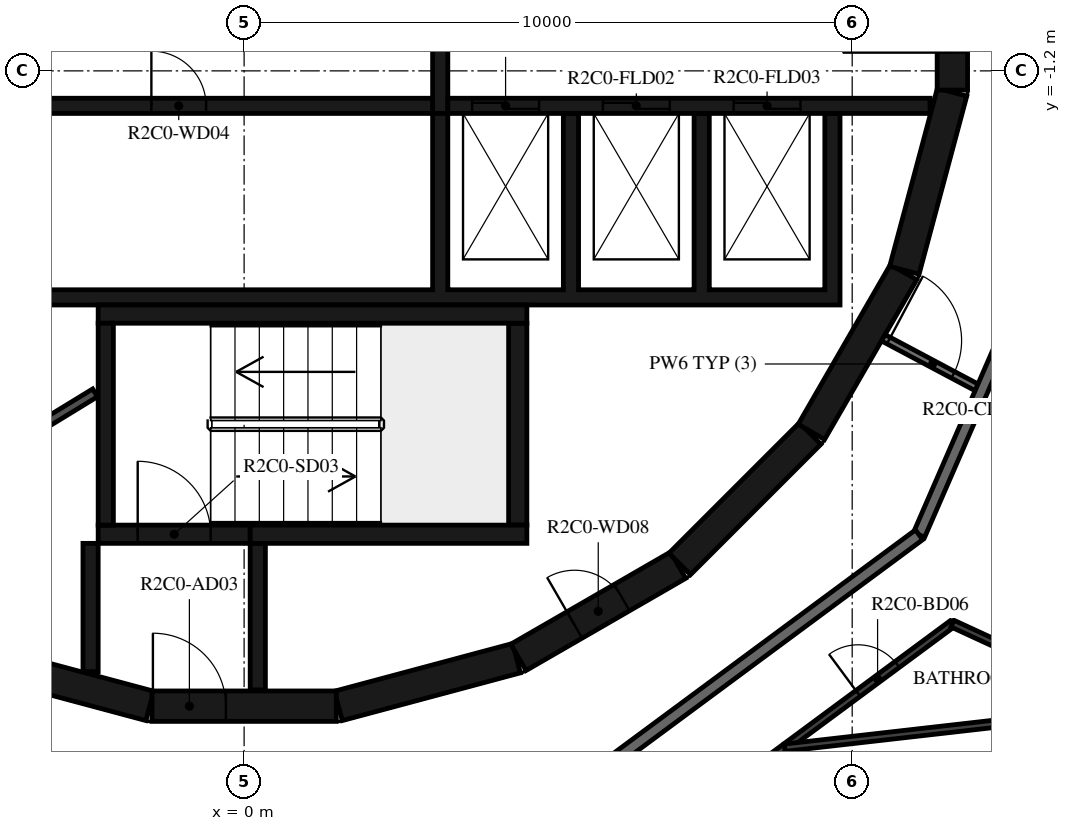
"""IFC4 building model, lengths in metres.
Left out: names, types, materials, properties, quantities, classifications, styles, units other than length and angle.
Written with IfcOpenShell. Run it as: python <this file> out.ifc"""

import sys

from ifc_helpers import new_model, si_unit, direction, frame, frame_2d, origin, place, context, subcontext, project, spatial, polyline, rectangle, outline, extrude, element, fill, save


model = new_model("IFC4")
c1 = context("Model", 3, precision=1e-05, world=origin(), true_north=direction((0.0, 1.0)))
c2 = subcontext(c1, "Body", "Model", "MODEL_VIEW")
j1 = project(units=[si_unit("LENGTHUNIT", "METRE"), si_unit("PLANEANGLEUNIT", "RADIAN")], contexts=[c1])
p1 = place(None, origin())
s1 = spatial("IfcSite", under=j1, at=p1, CompositionType="ELEMENT")
p2 = place(p1, origin())
s2 = spatial("IfcBuilding", under=s1, at=p2, CompositionType="ELEMENT")
p3 = place(p2, frame((0.0, 0.0, 97.7)))
s3 = spatial("IfcBuildingStorey", under=s2, at=p3, CompositionType="ELEMENT", Elevation=97.7)
p4 = place(p3, frame((1.55, -11.643, 0.0), z_axis=(0.0, 0.0, 1.0), x_axis=(0.965948410781, 0.258734743916, 0.0)))
e1 = element("IfcWall", 1, at=p4, inside=s3, PredefinedType="SHEAR", context=c2, shape_type="SweptSolid", body=[
    extrude(rectangle(XDim=3.033, YDim=0.5, at=frame_2d((1.516, 0.0))), origin(), (0.0, 0.0, 1.0), 3.12),
])
p5 = place(p3, frame((4.51, -10.845, 0.0), z_axis=(0.0, 0.0, 1.0), x_axis=(0.865975092491, 0.500087131594, 0.0)))
e2 = element("IfcWall", 2, at=p5, inside=s3, PredefinedType="SHEAR", context=c2, shape_type="SweptSolid", body=[
    extrude(rectangle(XDim=3.033, YDim=0.5, at=frame_2d((1.516, 0.0))), origin(), (0.0, 0.0, 1.0), 3.12),
])
p6 = place(p5, frame((1.066, 0.0, 0.0)))
e3 = element("IfcOpeningElement", 3, at=p6, cuts=e2, PredefinedType="OPENING", context=c2, shape_type="SweptSolid", body=[
    extrude(rectangle(XDim=0.9, YDim=2.1, at=frame_2d((0.45, 1.05))), frame((0.0, 0.26, 0.0), z_axis=(0.0, -1.0, 0.0), x_axis=(1.0, 0.0, 0.0)), (0.0, 0.0, 1.0), 0.52),
])
p7 = place(p3, frame((7.164, -9.308, 0.0), z_axis=(0.0, 0.0, 1.0), x_axis=(0.707106781187, 0.707106781187, 0.0)))
e4 = element("IfcWall", 4, at=p7, inside=s3, PredefinedType="SHEAR", context=c2, shape_type="SweptSolid", body=[
    extrude(rectangle(XDim=3.032, YDim=0.5, at=frame_2d((1.516, 0.0))), origin(), (0.0, 0.0, 1.0), 3.12),
])
for number, where, z_axis, x_axis in (
    (5, (9.329, -7.137, 0.0), (0.0, 0.0, 1.0), (0.5, 0.866, 0.0)),
    (6, (10.858, -4.479, 0.0), (0.0, 0.0, 1.0), (0.259, 0.966, 0.0)),
):
    element("IfcWall", number, at=place(p3, frame(where, z_axis=z_axis, x_axis=x_axis)), inside=s3, PredefinedType="SHEAR", context=c2, shape_type="SweptSolid", body=[
        extrude(rectangle(XDim=3.033, YDim=0.5, at=frame_2d((1.516, 0.0))), origin(), (0.0, 0.0, 1.0), 3.12),
    ])
p8 = place(p3, frame((11.647, -1.516, 0.0), z_axis=(0.0, 0.0, 1.0), x_axis=(0.0, 1.0, 0.0)))
e7 = element("IfcWall", 7, at=p8, inside=s3, PredefinedType="SHEAR", context=c2, shape_type="SweptSolid", body=[
    extrude(rectangle(XDim=3.033, YDim=0.5, at=frame_2d((1.516, 0.0))), origin(), (0.0, 0.0, 1.0), 3.12),
])
p9 = place(p8, frame((0.616, 0.0, 0.0)))
e8 = element("IfcOpeningElement", 8, at=p9, cuts=e7, PredefinedType="OPENING", context=c2, shape_type="SweptSolid", body=[
    extrude(rectangle(XDim=1.8, YDim=2.1, at=frame_2d((0.9, 1.05))), frame((0.0, 0.26, 0.0), z_axis=(0.0, -1.0, 0.0), x_axis=(1.0, 0.0, 0.0)), (0.0, 0.0, 1.0), 0.52),
])
p10 = place(p3, frame((-4.479, -10.858, 0.0), z_axis=(0.0, 0.0, 1.0), x_axis=(0.965948410781, -0.258734743916, 0.0)))
e9 = element("IfcWall", 9, at=p10, inside=s3, PredefinedType="SHEAR", context=c2, shape_type="SweptSolid", body=[
    extrude(rectangle(XDim=3.033, YDim=0.5, at=frame_2d((1.516, 0.0))), origin(), (0.0, 0.0, 1.0), 3.12),
])
p11 = place(p3, frame((-1.516, -11.647, 0.0), z_axis=(0.0, 0.0, 1.0), x_axis=(1.0, 0.0, 0.0)))
e10 = element("IfcWall", 10, at=p11, inside=s3, PredefinedType="SHEAR", context=c2, shape_type="SweptSolid", body=[
    extrude(rectangle(XDim=3.033, YDim=0.5, at=frame_2d((1.516, 0.0))), origin(), (0.0, 0.0, 1.0), 3.12),
])
p12 = place(p11, frame((0.016, 0.0, 0.0)))
e11 = element("IfcOpeningElement", 11, at=p12, cuts=e10, PredefinedType="OPENING", context=c2, shape_type="SweptSolid", body=[
    extrude(rectangle(XDim=1.2, YDim=2.1, at=frame_2d((0.6, 1.05))), frame((0.0, 0.26, 0.0), z_axis=(0.0, -1.0, 0.0), x_axis=(1.0, 0.0, 0.0)), (0.0, 0.0, 1.0), 0.52),
])
p13 = place(p3, frame((-2.275, -8.67, 0.0), z_axis=(0.0, 0.0, 1.0), x_axis=(0.0, 1.0, 0.0)))
e12 = element("IfcWall", 12, at=p13, inside=s3, PredefinedType="SHEAR", context=c2, shape_type="SweptSolid", body=[
    extrude(rectangle(XDim=3.32, YDim=0.25, at=frame_2d((1.66, 0.0))), origin(), (0.0, 0.0, 1.0), 3.12),
])
p14 = place(p3, frame((-2.4, -5.2, 0.0), z_axis=(0.0, 0.0, 1.0), x_axis=(1.0, 0.0, 0.0)))
e13 = element("IfcWall", 13, at=p14, inside=s3, PredefinedType="SHEAR", context=c2, shape_type="SweptSolid", body=[
    extrude(rectangle(XDim=7.05, YDim=0.3, at=frame_2d((3.525, 0.0))), origin(), (0.0, 0.0, 1.0), 3.12),
])
p15 = place(p3, frame((4.5, -8.67, 0.0), z_axis=(0.0, 0.0, 1.0), x_axis=(0.0, 1.0, 0.0)))
e14 = element("IfcWall", 14, at=p15, inside=s3, PredefinedType="SHEAR", context=c2, shape_type="SweptSolid", body=[
    extrude(rectangle(XDim=3.32, YDim=0.3, at=frame_2d((1.66, 0.0))), origin(), (0.0, 0.0, 1.0), 3.12),
])
p16 = place(p3, frame((0.1, -8.82, 0.0), z_axis=(0.0, 0.0, 1.0), x_axis=(1.0, 0.0, 0.0)))
e15 = element("IfcWall", 15, at=p16, inside=s3, PredefinedType="SHEAR", context=c2, shape_type="SweptSolid", body=[
    extrude(rectangle(XDim=4.55, YDim=0.3, at=frame_2d((2.275, 0.0))), origin(), (0.0, 0.0, 1.0), 3.12),
])
p17 = place(p3, frame((-2.4, -8.82, 0.0), z_axis=(0.0, 0.0, 1.0), x_axis=(1.0, 0.0, 0.0)))
e16 = element("IfcWall", 16, at=p17, inside=s3, PredefinedType="SHEAR", context=c2, shape_type="SweptSolid", body=[
    extrude(rectangle(XDim=2.5, YDim=0.3, at=frame_2d((1.25, 0.0))), origin(), (0.0, 0.0, 1.0), 3.12),
])
p18 = place(p17, frame((0.65, 0.0, 0.0)))
e17 = element("IfcOpeningElement", 17, at=p18, cuts=e16, PredefinedType="OPENING", context=c2, shape_type="SweptSolid", body=[
    extrude(rectangle(XDim=1.2, YDim=2.1, at=frame_2d((0.6, 1.05))), frame((0.0, 0.16, 0.0), z_axis=(0.0, -1.0, 0.0), x_axis=(1.0, 0.0, 0.0)), (0.0, 0.0, 1.0), 0.32),
])
p19 = place(p3, frame((-2.525, -8.97, 0.0), z_axis=(0.0, 0.0, 1.0), x_axis=(0.0, -1.0, 0.0)))
e18 = element("IfcWall", 18, at=p19, inside=s3, PredefinedType="SHEAR", context=c2, shape_type="SweptSolid", body=[
    extrude(rectangle(XDim=2.11, YDim=0.25, at=frame_2d((1.055, 0.0))), origin(), (0.0, 0.0, 1.0), 3.12),
])
p20 = place(p3, frame((0.225, -8.97, 0.0), z_axis=(0.0, 0.0, 1.0), x_axis=(0.0, -1.0, 0.0)))
e19 = element("IfcWall", 19, at=p20, inside=s3, PredefinedType="SHEAR", context=c2, shape_type="SweptSolid", body=[
    extrude(rectangle(XDim=2.41, YDim=0.25, at=frame_2d((1.205, 0.0))), origin(), (0.0, 0.0, 1.0), 3.12),
])
p21 = place(p3, origin())
e20 = element("IfcWall", 20, at=p21, inside=s3, PredefinedType="SHEAR", context=c2, shape_type="SweptSolid", body=[
    extrude(outline(polyline([(9.8, -5.05), (9.8, -4.8), (9.8, -1.9), (9.55, -1.9), (9.55, -4.8), (7.65, -4.8), (7.65, -1.9), (7.4, -1.9), (7.4, -4.8), (5.5, -4.8), (5.5, -1.9), (5.25, -1.9), (5.25, -4.8), (3.35, -4.8), (3.35, -1.9), (3.1, -1.9), (3.1, -4.8), (-5.25, -4.8), (-5.25, -1.9), (-5.5, -1.9), (-5.5, -4.8), (-7.4, -4.8), (-7.4, -1.9), (-7.65, -1.9), (-7.65, -4.8), (-9.55, -4.8), (-9.55, -1.9), (-9.8, -1.9), (-9.8, -4.8), (-9.8, -5.05), (9.8, -5.05)])), origin(), (0.0, 0.0, 1.0), 3.12),
])
p22 = place(p3, frame((-11.28, -1.775, 0.0), z_axis=(0.0, 0.0, 1.0), x_axis=(1.0, 0.0, 0.0)))
e21 = element("IfcWall", 21, at=p22, inside=s3, PredefinedType="SHEAR", context=c2, shape_type="SweptSolid", body=[
    extrude(rectangle(XDim=14.38, YDim=0.25, at=frame_2d((7.19, 0.0))), origin(), (0.0, 0.0, 1.0), 3.12),
])
p23 = place(p22, frame((9.755, 0.0, 0.0)))
e22 = element("IfcOpeningElement", 22, at=p23, cuts=e21, PredefinedType="OPENING", context=c2, shape_type="SweptSolid", body=[
    extrude(rectangle(XDim=0.9, YDim=2.1, at=frame_2d((0.45, 1.05))), frame((0.0, 0.135, 0.0), z_axis=(0.0, -1.0, 0.0), x_axis=(1.0, 0.0, 0.0)), (0.0, 0.0, 1.0), 0.27),
])
p24 = place(p3, frame((3.35, -1.775, 0.0), z_axis=(0.0, 0.0, 1.0), x_axis=(1.0, 0.0, 0.0)))
e23 = element("IfcWall", 23, at=p24, inside=s3, PredefinedType="SHEAR", context=c2, shape_type="SweptSolid", body=[
    extrude(rectangle(XDim=7.93, YDim=0.25, at=frame_2d((3.965, 0.0))), origin(), (0.0, 0.0, 1.0), 3.12),
])
p25 = place(p24, frame((0.4, 0.0, 0.0)))
e24 = element("IfcOpeningElement", 24, at=p25, cuts=e23, PredefinedType="OPENING", context=c2, shape_type="SweptSolid", body=[
    extrude(rectangle(XDim=1.1, YDim=2.4, at=frame_2d((0.55, 1.2))), frame((0.0, 0.135, 0.0), z_axis=(0.0, -1.0, 0.0), x_axis=(1.0, 0.0, 0.0)), (0.0, 0.0, 1.0), 0.27),
])
p26 = place(p24, frame((2.55, 0.0, 0.0)))
e25 = element("IfcOpeningElement", 25, at=p26, cuts=e23, PredefinedType="OPENING", context=c2, shape_type="SweptSolid", body=[
    extrude(rectangle(XDim=1.1, YDim=2.4, at=frame_2d((0.55, 1.2))), frame((0.0, 0.135, 0.0), z_axis=(0.0, -1.0, 0.0), x_axis=(1.0, 0.0, 0.0)), (0.0, 0.0, 1.0), 0.27),
])
p27 = place(p24, frame((4.7, 0.0, 0.0)))
e26 = element("IfcOpeningElement", 26, at=p27, cuts=e23, PredefinedType="OPENING", context=c2, shape_type="SweptSolid", body=[
    extrude(rectangle(XDim=1.1, YDim=2.4, at=frame_2d((0.55, 1.2))), frame((0.0, 0.135, 0.0), z_axis=(0.0, -1.0, 0.0), x_axis=(1.0, 0.0, 0.0)), (0.0, 0.0, 1.0), 0.27),
])
p28 = place(p3, frame((3.225, -1.9, 0.0), z_axis=(0.0, 0.0, 1.0), x_axis=(0.0, 1.0, 0.0)))
e27 = element("IfcWall", 27, at=p28, inside=s3, PredefinedType="SHEAR", context=c2, shape_type="SweptSolid", body=[
    extrude(rectangle(XDim=3.8, YDim=0.25, at=frame_2d((1.9, 0.0))), origin(), (0.0, 0.0, 1.0), 3.12),
])
p29 = place(p3, frame((-2.451, -6.495, 0.0), z_axis=(0.0, 0.0, 1.0), x_axis=(-0.853250115418, -0.521501908471, 0.0)))
e28 = element("IfcWall", 28, at=p29, inside=s3, PredefinedType="PARTITIONING", context=c2, shape_type="SweptSolid", body=[
    extrude(rectangle(XDim=5.137, YDim=0.15, at=frame_2d((2.569, 0.0))), origin(), (0.0, 0.0, 1.0), 3.12),
])
p30 = place(p29, frame((2.119, 0.0, 0.0)))
e29 = element("IfcOpeningElement", 29, at=p30, cuts=e28, PredefinedType="OPENING", context=c2, shape_type="SweptSolid", body=[
    extrude(rectangle(XDim=0.9, YDim=2.1, at=frame_2d((0.45, 1.05))), frame((0.0, 0.085, 0.0), z_axis=(0.0, -1.0, 0.0), x_axis=(1.0, 0.0, 0.0)), (0.0, 0.0, 1.0), 0.17),
])
p31 = place(p3, frame((10.511, -5.589, 0.0), z_axis=(0.0, 0.0, 1.0), x_axis=(0.882962602189, -0.469443333253, 0.0)))
e30 = element("IfcWall", 30, at=p31, inside=s3, PredefinedType="PARTITIONING", context=c2, shape_type="SweptSolid", body=[
    extrude(rectangle(XDim=1.838, YDim=0.12, at=frame_2d((0.919, 0.0))), origin(), (0.0, 0.0, 1.0), 3.12),
])
p32 = place(p31, frame((0.1, 0.0, 0.0)))
e31 = element("IfcOpeningElement", 31, at=p32, cuts=e30, PredefinedType="OPENING", context=c2, shape_type="SweptSolid", body=[
    extrude(rectangle(XDim=1.2, YDim=2.1, at=frame_2d((0.6, 1.05))), frame((0.0, 0.07, 0.0), z_axis=(0.0, -1.0, 0.0), x_axis=(1.0, 0.0, 0.0)), (0.0, 0.0, 1.0), 0.14),
])
p33 = place(p3, frame((11.1, -8.829, 0.0), z_axis=(0.0, 0.0, 1.0), x_axis=(0.398741918631, 0.917063183388, 0.0)))
e32 = element("IfcWall", 32, at=p33, inside=s3, PredefinedType="STANDARD", context=c2, shape_type="SweptSolid", body=[
    extrude(rectangle(XDim=7.342, YDim=0.2, at=frame_2d((3.671, 0.0))), origin(), (0.0, 0.0, 1.0), 3.12),
])
p34 = place(p3, frame((-8.829, -11.1, 0.0), z_axis=(0.0, 0.0, 1.0), x_axis=(0.917063622491, -0.398740908742, 0.0)))
e33 = element("IfcWall", 33, at=p34, inside=s3, PredefinedType="STANDARD", context=c2, shape_type="SweptSolid", body=[
    extrude(rectangle(XDim=7.24, YDim=0.2, at=frame_2d((3.62, 0.0))), origin(), (0.0, 0.0, 1.0), 3.12),
])
p35 = place(p34, frame((6.04, 0.0, 0.0)))
e34 = element("IfcOpeningElement", 34, at=p35, cuts=e33, PredefinedType="OPENING", context=c2, shape_type="SweptSolid", body=[
    extrude(rectangle(XDim=1.0, YDim=2.1, at=frame_2d((0.5, 1.05))), frame((0.0, 0.11, 0.0), z_axis=(0.0, -1.0, 0.0), x_axis=(1.0, 0.0, 0.0)), (0.0, 0.0, 1.0), 0.22),
])
p36 = place(p3, frame((5.198, -13.196, 0.0), z_axis=(0.0, 0.0, 1.0), x_axis=(0.803869883159, 0.594805187394, 0.0)))
e35 = element("IfcWall", 35, at=p36, inside=s3, PredefinedType="STANDARD", context=c2, shape_type="SweptSolid", body=[
    extrude(rectangle(XDim=7.342, YDim=0.2, at=frame_2d((3.671, 0.0))), origin(), (0.0, 0.0, 1.0), 3.12),
])
p37 = place(p3, frame((-9.562, -12.417, 0.0), z_axis=(0.0, 0.0, 1.0), x_axis=(0.917063169851, -0.398741949767, 0.0)))
e36 = element("IfcWall", 36, at=p37, inside=s3, PredefinedType="PARTITIONING", context=c2, shape_type="SweptSolid", body=[
    extrude(rectangle(XDim=7.891, YDim=0.12, at=frame_2d((3.946, 0.0))), origin(), (0.0, 0.0, 1.0), 3.12),
])
p38 = place(p37, frame((0.715, 0.0, 0.0)))
e37 = element("IfcOpeningElement", 37, at=p38, cuts=e36, PredefinedType="OPENING", context=c2, shape_type="SweptSolid", body=[
    extrude(rectangle(XDim=0.8, YDim=2.1, at=frame_2d((0.4, 1.05))), frame((0.0, 0.07, 0.0), z_axis=(0.0, -1.0, 0.0), x_axis=(1.0, 0.0, 0.0)), (0.0, 0.0, 1.0), 0.14),
])
p39 = place(p3, frame((5.767, -14.641, 0.0), z_axis=(0.0, 0.0, 1.0), x_axis=(0.803867427863, 0.594808505673, 0.0)))
e38 = element("IfcWall", 38, at=p39, inside=s3, PredefinedType="PARTITIONING", context=c2, shape_type="SweptSolid", body=[
    extrude(rectangle(XDim=7.316, YDim=0.12, at=frame_2d((3.658, 0.0))), origin(), (0.0, 0.0, 1.0), 3.12),
])
p40 = place(p39, frame((0.2, 0.0, 0.0)))
e39 = element("IfcOpeningElement", 39, at=p40, cuts=e38, PredefinedType="OPENING", context=c2, shape_type="SweptSolid", body=[
    extrude(rectangle(XDim=0.9, YDim=2.1, at=frame_2d((0.45, 1.05))), frame((0.0, 0.07, 0.0), z_axis=(0.0, -1.0, 0.0), x_axis=(1.0, 0.0, 0.0)), (0.0, 0.0, 1.0), 0.14),
])
p41 = place(p39, frame((5.385, 0.0, 0.0)))
e40 = element("IfcOpeningElement", 40, at=p41, cuts=e38, PredefinedType="OPENING", context=c2, shape_type="SweptSolid", body=[
    extrude(rectangle(XDim=0.8, YDim=2.1, at=frame_2d((0.4, 1.05))), frame((0.0, 0.07, 0.0), z_axis=(0.0, -1.0, 0.0), x_axis=(1.0, 0.0, 0.0)), (0.0, 0.0, 1.0), 0.14),
])
p42 = place(p3, frame((11.649, -10.289, 0.0), z_axis=(0.0, 0.0, 1.0), x_axis=(0.9079269461, -0.419128453514, 0.0)))
e41 = element("IfcWall", 41, at=p42, inside=s3, PredefinedType="PARTITIONING", context=c2, shape_type="SweptSolid", body=[
    extrude(rectangle(XDim=3.304, YDim=0.12, at=frame_2d((1.652, 0.0))), origin(), (0.0, 0.0, 1.0), 3.12),
])
p43 = place(p3, frame((14.649, -11.674, 0.0), z_axis=(0.0, 0.0, 1.0), x_axis=(-0.993573746873, -0.113186613721, 0.0)))
e42 = element("IfcWall", 42, at=p43, inside=s3, PredefinedType="PARTITIONING", context=c2, shape_type="SweptSolid", body=[
    extrude(rectangle(XDim=5.796, YDim=0.12, at=frame_2d((2.898, 0.0))), origin(), (0.0, 0.0, 1.0), 3.12),
])
p44 = place(p18, origin())
e43 = element("IfcDoor", 43, at=p44, inside=s3, OperationType="SINGLE_SWING_LEFT", PredefinedType="DOOR", context=c2, shape_type="SweptSolid", body=[
    extrude(rectangle(XDim=1.2, YDim=2.1, at=frame_2d((0.6, 1.05))), frame((0.0, 0.025, 0.0), z_axis=(0.0, -1.0, 0.0), x_axis=(1.0, 0.0, 0.0)), (0.0, 0.0, 1.0), 0.05),
])
fill(e17, e43)
p45 = place(p12, origin())
e44 = element("IfcDoor", 44, at=p45, inside=s3, OperationType="SINGLE_SWING_RIGHT", PredefinedType="DOOR", context=c2, shape_type="SweptSolid", body=[
    extrude(rectangle(XDim=1.2, YDim=2.1, at=frame_2d((0.6, 1.05))), frame((0.0, 0.025, 0.0), z_axis=(0.0, -1.0, 0.0), x_axis=(1.0, 0.0, 0.0)), (0.0, 0.0, 1.0), 0.05),
])
fill(e11, e44)
p46 = place(p9, origin())
e45 = element("IfcDoor", 45, at=p46, inside=s3, OperationType="DOUBLE_DOOR_SINGLE_SWING", PredefinedType="DOOR", context=c2, shape_type="SweptSolid", body=[
    extrude(rectangle(XDim=1.8, YDim=2.1, at=frame_2d((0.9, 1.05))), frame((0.0, 0.025, 0.0), z_axis=(0.0, -1.0, 0.0), x_axis=(1.0, 0.0, 0.0)), (0.0, 0.0, 1.0), 0.05),
])
fill(e8, e45)
p47 = place(p25, origin())
e46 = element("IfcDoor", 46, at=p47, inside=s3, OperationType="DOUBLE_DOOR_SLIDING", PredefinedType="DOOR", context=c2, shape_type="SweptSolid", body=[
    extrude(rectangle(XDim=1.1, YDim=2.4, at=frame_2d((0.55, 1.2))), frame((0.0, 0.025, 0.0), z_axis=(0.0, -1.0, 0.0), x_axis=(1.0, 0.0, 0.0)), (0.0, 0.0, 1.0), 0.05),
])
fill(e24, e46)
p48 = place(p26, origin())
e47 = element("IfcDoor", 47, at=p48, inside=s3, OperationType="DOUBLE_DOOR_SLIDING", PredefinedType="DOOR", context=c2, shape_type="SweptSolid", body=[
    extrude(rectangle(XDim=1.1, YDim=2.4, at=frame_2d((0.55, 1.2))), frame((0.0, 0.025, 0.0), z_axis=(0.0, -1.0, 0.0), x_axis=(1.0, 0.0, 0.0)), (0.0, 0.0, 1.0), 0.05),
])
fill(e25, e47)
p49 = place(p27, origin())
e48 = element("IfcDoor", 48, at=p49, inside=s3, OperationType="DOUBLE_DOOR_SLIDING", PredefinedType="DOOR", context=c2, shape_type="SweptSolid", body=[
    extrude(rectangle(XDim=1.1, YDim=2.4, at=frame_2d((0.55, 1.2))), frame((0.0, 0.025, 0.0), z_axis=(0.0, -1.0, 0.0), x_axis=(1.0, 0.0, 0.0)), (0.0, 0.0, 1.0), 0.05),
])
fill(e26, e48)
p50 = place(p23, origin())
e49 = element("IfcDoor", 49, at=p50, inside=s3, OperationType="SINGLE_SWING_LEFT", PredefinedType="DOOR", context=c2, shape_type="SweptSolid", body=[
    extrude(rectangle(XDim=0.9, YDim=2.1, at=frame_2d((0.45, 1.05))), frame((0.0, 0.025, 0.0), z_axis=(0.0, -1.0, 0.0), x_axis=(1.0, 0.0, 0.0)), (0.0, 0.0, 1.0), 0.05),
])
fill(e22, e49)
p51 = place(p6, origin())
e50 = element("IfcDoor", 50, at=p51, inside=s3, OperationType="SINGLE_SWING_LEFT", PredefinedType="DOOR", context=c2, shape_type="SweptSolid", body=[
    extrude(rectangle(XDim=0.9, YDim=2.1, at=frame_2d((0.45, 1.05))), frame((0.0, 0.025, 0.0), z_axis=(0.0, -1.0, 0.0), x_axis=(1.0, 0.0, 0.0)), (0.0, 0.0, 1.0), 0.05),
])
fill(e3, e50)
p52 = place(p41, origin())
e51 = element("IfcDoor", 51, at=p52, inside=s3, OperationType="SINGLE_SWING_RIGHT", PredefinedType="DOOR", context=c2, shape_type="SweptSolid", body=[
    extrude(rectangle(XDim=0.8, YDim=2.1, at=frame_2d((0.4, 1.05))), frame((0.0, 0.025, 0.0), z_axis=(0.0, -1.0, 0.0), x_axis=(1.0, 0.0, 0.0)), (0.0, 0.0, 1.0), 0.05),
])
fill(e40, e51)
p53 = place(p32, origin())
e52 = element("IfcDoor", 52, at=p53, inside=s3, OperationType="DOUBLE_DOOR_SINGLE_SWING", PredefinedType="DOOR", context=c2, shape_type="SweptSolid", body=[
    extrude(rectangle(XDim=1.2, YDim=2.1, at=frame_2d((0.6, 1.05))), frame((0.0, 0.025, 0.0), z_axis=(0.0, -1.0, 0.0), x_axis=(1.0, 0.0, 0.0)), (0.0, 0.0, 1.0), 0.05),
])
fill(e31, e52)
save(model, sys.argv[1])
